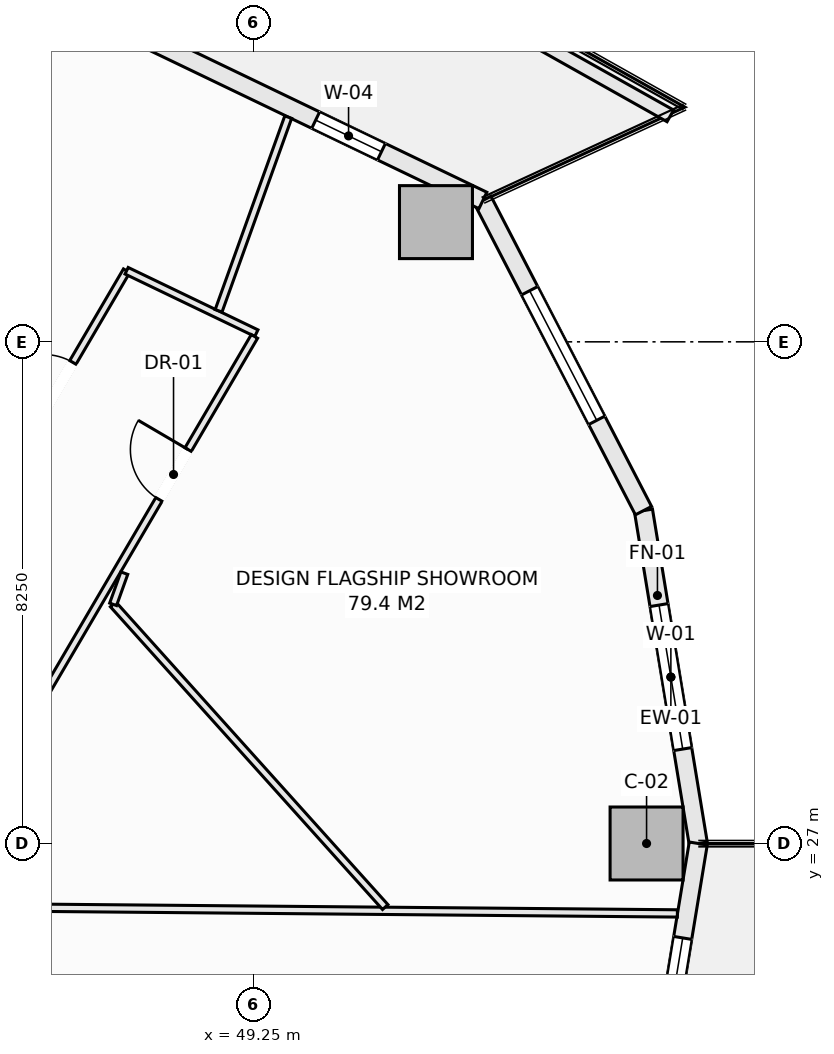
"""IFC4 building model, lengths in metres.
Left out: names, types, materials, properties, quantities, classifications, styles, units other than length and angle.
Written with IfcOpenShell. Run it as: python <this file> out.ifc"""

import sys

from ifc_helpers import new_model, si_unit, direction, frame, frame_2d, origin, origin_2d, place, context, subcontext, project, spatial, rectangle, extrude, element, fill, save


model = new_model("IFC4")
c1 = context("Model", 3, precision=1e-05, world=origin(), true_north=direction((0.0, 1.0)))
c2 = subcontext(c1, "Body", "Model", "MODEL_VIEW")
j1 = project(units=[si_unit("LENGTHUNIT", "METRE"), si_unit("PLANEANGLEUNIT", "RADIAN")], contexts=[c1])
p1 = place(None, origin())
s1 = spatial("IfcSite", under=j1, at=p1, CompositionType="ELEMENT")
p2 = place(p1, origin())
s2 = spatial("IfcBuilding", under=s1, at=p2, CompositionType="ELEMENT")
p3 = place(p2, frame((0.0, 0.0, 53.45)))
s3 = spatial("IfcBuildingStorey", under=s2, at=p3, CompositionType="ELEMENT", Elevation=53.45)
for number, where, z_axis, x_axis in (
    (1, (55.712, 27.0, -0.28), (0.0, 0.0, 1.0), (1.0, 0.0, 0.0)),
    (2, (52.249, 37.219, -0.28), (0.0, 0.0, 1.0), (1.0, 0.0, 0.0)),
):
    element("IfcColumn", number, at=place(p3, frame(where, z_axis=z_axis, x_axis=x_axis)), inside=s3, PredefinedType="COLUMN", context=c2, shape_type="SweptSolid", body=[
        extrude(rectangle(XDim=1.2, YDim=1.2, at=origin_2d()), origin(), (0.0, 0.0, 1.0), 3.85),
    ])
p4 = place(p3, frame((55.662, 32.474, 0.0), z_axis=(0.0, 0.0, 1.0), x_axis=(0.162386212206, -0.986727276447, 0.0)))
e3 = element("IfcWall", 3, at=p4, inside=s3, PredefinedType="SOLIDWALL", context=c2, shape_type="SweptSolid", body=[
    extrude(rectangle(XDim=5.548, YDim=0.3, at=frame_2d((2.774, 0.0))), origin(), (0.0, 0.0, 1.0), 3.093),
])
p5 = place(p4, frame((1.574, 0.0, 0.85)))
e4 = element("IfcOpeningElement", 4, at=p5, cuts=e3, PredefinedType="OPENING", context=c2, shape_type="SweptSolid", body=[
    extrude(rectangle(XDim=2.4, YDim=1.9, at=frame_2d((1.2, 0.95))), frame((0.0, 0.16, 0.0), z_axis=(0.0, -1.0, 0.0), x_axis=(1.0, 0.0, 0.0)), (0.0, 0.0, 1.0), 0.32),
])
p6 = place(p3, frame((53.021, 37.575, 0.0), z_axis=(0.0, 0.0, 1.0), x_axis=(0.459800981414, -0.888021991558, 0.0)))
e5 = element("IfcWall", 5, at=p6, inside=s3, PredefinedType="SOLIDWALL", context=c2, shape_type="SweptSolid", body=[
    extrude(rectangle(XDim=5.744, YDim=0.3, at=frame_2d((2.872, 0.0))), origin(), (0.0, 0.0, 1.0), 3.093),
])
p7 = place(p6, frame((1.672, 0.0, 0.85)))
e6 = element("IfcOpeningElement", 6, at=p7, cuts=e5, PredefinedType="OPENING", context=c2, shape_type="SweptSolid", body=[
    extrude(rectangle(XDim=2.4, YDim=1.9, at=frame_2d((1.2, 0.95))), frame((0.0, 0.16, 0.0), z_axis=(0.0, -1.0, 0.0), x_axis=(1.0, 0.0, 0.0)), (0.0, 0.0, 1.0), 0.32),
])
p8 = place(p3, frame((47.224, 40.36, 0.0), z_axis=(0.0, 0.0, 1.0), x_axis=(0.901354747727, -0.433081538224, 0.0)))
e7 = element("IfcWall", 7, at=p8, inside=s3, PredefinedType="SOLIDWALL", context=c2, shape_type="SweptSolid", body=[
    extrude(rectangle(XDim=6.431, YDim=0.3, at=frame_2d((3.215, 0.0))), origin(), (0.0, 0.0, 1.0), 3.093),
])
p9 = place(p8, frame((3.38, 0.0, 0.72)))
e8 = element("IfcOpeningElement", 8, at=p9, cuts=e7, PredefinedType="OPENING", context=c2, shape_type="SweptSolid", body=[
    extrude(rectangle(XDim=1.2, YDim=1.65, at=frame_2d((0.6, 0.825))), frame((0.0, 0.16, 0.0), z_axis=(0.0, -1.0, 0.0), x_axis=(1.0, 0.0, 0.0)), (0.0, 0.0, 1.0), 0.32),
])
p10 = place(p3, frame((55.662, 21.526, 0.0), z_axis=(0.0, 0.0, 1.0), x_axis=(0.162386212206, 0.986727276447, 0.0)))
e9 = element("IfcWall", 9, at=p10, inside=s3, PredefinedType="SOLIDWALL", context=c2, shape_type="SweptSolid", body=[
    extrude(rectangle(XDim=5.548, YDim=0.3, at=frame_2d((2.774, 0.0))), origin(), (0.0, 0.0, 1.0), 3.093),
])
p11 = place(p10, frame((1.574, 0.0, 0.85)))
e10 = element("IfcOpeningElement", 10, at=p11, cuts=e9, PredefinedType="OPENING", context=c2, shape_type="SweptSolid", body=[
    extrude(rectangle(XDim=2.4, YDim=1.9, at=frame_2d((1.2, 0.95))), frame((0.0, 0.16, 0.0), z_axis=(0.0, -1.0, 0.0), x_axis=(1.0, 0.0, 0.0)), (0.0, 0.0, 1.0), 0.32),
])
p12 = place(p3, frame((49.868, 42.469, 0.0), z_axis=(0.0, 0.0, 1.0), x_axis=(0.871775109335, -0.489906275468, 0.0)))
e11 = element("IfcWall", 11, at=p12, inside=s3, PredefinedType="PARAPET", context=c2, shape_type="SweptSolid", body=[
    extrude(rectangle(XDim=7.152, YDim=0.22, at=frame_2d((3.576, 0.0))), origin(), (0.0, 0.0, 1.0), 0.52),
])
p13 = place(p3, frame((44.056, 31.12, 0.0), z_axis=(0.0, 0.0, 1.0), x_axis=(0.505570543943, 0.86278527172, 0.0)))
e12 = element("IfcWall", 12, at=p13, inside=s3, PredefinedType="PARTITIONING", context=c2, shape_type="SweptSolid", body=[
    extrude(rectangle(XDim=6.142, YDim=0.12, at=frame_2d((3.071, 0.0))), origin(), (0.0, 0.0, 1.0), 3.205),
])
p14 = place(p13, frame((3.444, 0.0, 0.0)))
e13 = element("IfcOpeningElement", 13, at=p14, cuts=e12, PredefinedType="OPENING", context=c2, shape_type="SweptSolid", body=[
    extrude(rectangle(XDim=0.95, YDim=2.1, at=frame_2d((0.475, 1.05))), frame((0.0, 0.07, 0.0), z_axis=(0.0, -1.0, 0.0), x_axis=(1.0, 0.0, 0.0)), (0.0, 0.0, 1.0), 0.14),
])
p15 = place(p3, frame((47.161, 36.419, 0.0), z_axis=(0.0, 0.0, 1.0), x_axis=(0.901268684569, -0.433260612351, 0.0)))
e14 = element("IfcWall", 14, at=p15, inside=s3, PredefinedType="PARTITIONING", context=c2, shape_type="SweptSolid", body=[
    extrude(rectangle(XDim=2.368, YDim=0.12, at=frame_2d((1.184, 0.0))), origin(), (0.0, 0.0, 1.0), 3.57),
])
p16 = place(p3, frame((45.67, 29.207, 0.0), z_axis=(0.0, 0.0, 1.0), x_axis=(0.505582857323, 0.86277805627, 0.0)))
e15 = element("IfcWall", 15, at=p16, inside=s3, PredefinedType="PARTITIONING", context=c2, shape_type="SweptSolid", body=[
    extrude(rectangle(XDim=7.108, YDim=0.12, at=frame_2d((3.554, 0.0))), origin(), (0.0, 0.0, 1.0), 3.57),
])
p17 = place(p16, frame((4.0, 0.0, 0.0)))
e16 = element("IfcOpeningElement", 16, at=p17, cuts=e15, PredefinedType="OPENING", context=c2, shape_type="SweptSolid", body=[
    extrude(rectangle(XDim=0.95, YDim=2.1, at=frame_2d((0.475, 1.05))), frame((0.0, 0.07, 0.0), z_axis=(0.0, -1.0, 0.0), x_axis=(1.0, 0.0, 0.0)), (0.0, 0.0, 1.0), 0.14),
])
p18 = place(p3, frame((45.732, 25.943, 0.0), z_axis=(0.0, 0.0, 1.0), x_axis=(0.999960667943, -0.008869192068, 0.0)))
e17 = element("IfcWall", 17, at=p18, inside=s3, PredefinedType="PARTITIONING", context=c2, shape_type="SweptSolid", body=[
    extrude(rectangle(XDim=10.488, YDim=0.12, at=frame_2d((5.244, 0.0))), origin(), (0.0, 0.0, 1.0), 3.57),
])
p19 = place(p3, frame((46.939, 30.933, 0.0), z_axis=(0.0, 0.0, 1.0), x_axis=(0.668545536635, -0.743671207891, 0.0)))
e18 = element("IfcWall", 18, at=p19, inside=s3, PredefinedType="PARTITIONING", context=c2, shape_type="SweptSolid", body=[
    extrude(rectangle(XDim=6.695, YDim=0.12, at=frame_2d((3.347, 0.0))), origin(), (0.0, 0.0, 1.0), 3.57),
])
p20 = place(p3, frame((46.939, 30.933, 0.0), z_axis=(0.0, 0.0, 1.0), x_axis=(0.338322740583, 0.941030139371, 0.0)))
e19 = element("IfcWall", 19, at=p20, inside=s3, PredefinedType="PARTITIONING", context=c2, shape_type="SweptSolid", body=[
    extrude(rectangle(XDim=0.545, YDim=0.12, at=frame_2d((0.272, 0.0))), origin(), (0.0, 0.0, 1.0), 3.57),
])
p21 = place(p3, frame((48.674, 35.76, 0.0), z_axis=(0.0, 0.0, 1.0), x_axis=(0.338241657323, 0.941059286789, 0.0)))
e20 = element("IfcWall", 20, at=p21, inside=s3, PredefinedType="PARTITIONING", context=c2, shape_type="SweptSolid", body=[
    extrude(rectangle(XDim=3.384, YDim=0.12, at=frame_2d((1.692, 0.0))), origin(), (0.0, 0.0, 1.0), 3.57),
])
p22 = place(p5, origin())
e21 = element("IfcWindow", 21, at=p22, inside=s3, PartitioningType="SINGLE_PANEL", PredefinedType="WINDOW", context=c2, shape_type="SweptSolid", body=[
    extrude(rectangle(XDim=2.4, YDim=1.9, at=frame_2d((1.2, 0.95))), frame((0.0, 0.03, 0.0), z_axis=(0.0, -1.0, 0.0), x_axis=(1.0, 0.0, 0.0)), (0.0, 0.0, 1.0), 0.06),
])
fill(e4, e21)
p23 = place(p7, origin())
e22 = element("IfcWindow", 22, at=p23, inside=s3, PartitioningType="SINGLE_PANEL", PredefinedType="WINDOW", context=c2, shape_type="SweptSolid", body=[
    extrude(rectangle(XDim=2.4, YDim=1.9, at=frame_2d((1.2, 0.95))), frame((0.0, 0.03, 0.0), z_axis=(0.0, -1.0, 0.0), x_axis=(1.0, 0.0, 0.0)), (0.0, 0.0, 1.0), 0.06),
])
fill(e6, e22)
p24 = place(p9, origin())
e23 = element("IfcWindow", 23, at=p24, inside=s3, PartitioningType="SINGLE_PANEL", PredefinedType="WINDOW", context=c2, shape_type="SweptSolid", body=[
    extrude(rectangle(XDim=1.2, YDim=1.65, at=frame_2d((0.6, 0.825))), frame((0.0, 0.03, 0.0), z_axis=(0.0, -1.0, 0.0), x_axis=(1.0, 0.0, 0.0)), (0.0, 0.0, 1.0), 0.06),
])
fill(e8, e23)
p25 = place(p11, origin())
e24 = element("IfcWindow", 24, at=p25, inside=s3, PartitioningType="SINGLE_PANEL", PredefinedType="WINDOW", context=c2, shape_type="SweptSolid", body=[
    extrude(rectangle(XDim=2.4, YDim=1.9, at=frame_2d((1.2, 0.95))), frame((0.0, 0.03, 0.0), z_axis=(0.0, -1.0, 0.0), x_axis=(1.0, 0.0, 0.0)), (0.0, 0.0, 1.0), 0.06),
])
fill(e10, e24)
p26 = place(p17, origin())
e25 = element("IfcDoor", 25, at=p26, inside=s3, OperationType="SINGLE_SWING_RIGHT", PredefinedType="DOOR", context=c2, shape_type="SweptSolid", body=[
    extrude(rectangle(XDim=0.95, YDim=2.1, at=frame_2d((0.475, 1.05))), frame((0.0, 0.025, 0.0), z_axis=(0.0, -1.0, 0.0), x_axis=(1.0, 0.0, 0.0)), (0.0, 0.0, 1.0), 0.05),
])
fill(e16, e25)
p27 = place(p14, origin())
e26 = element("IfcDoor", 26, at=p27, inside=s3, OperationType="SINGLE_SWING_LEFT", PredefinedType="DOOR", context=c2, shape_type="SweptSolid", body=[
    extrude(rectangle(XDim=0.95, YDim=2.1, at=frame_2d((0.475, 1.05))), frame((0.0, 0.025, 0.0), z_axis=(0.0, -1.0, 0.0), x_axis=(1.0, 0.0, 0.0)), (0.0, 0.0, 1.0), 0.05),
])
fill(e13, e26)
save(model, sys.argv[1])
